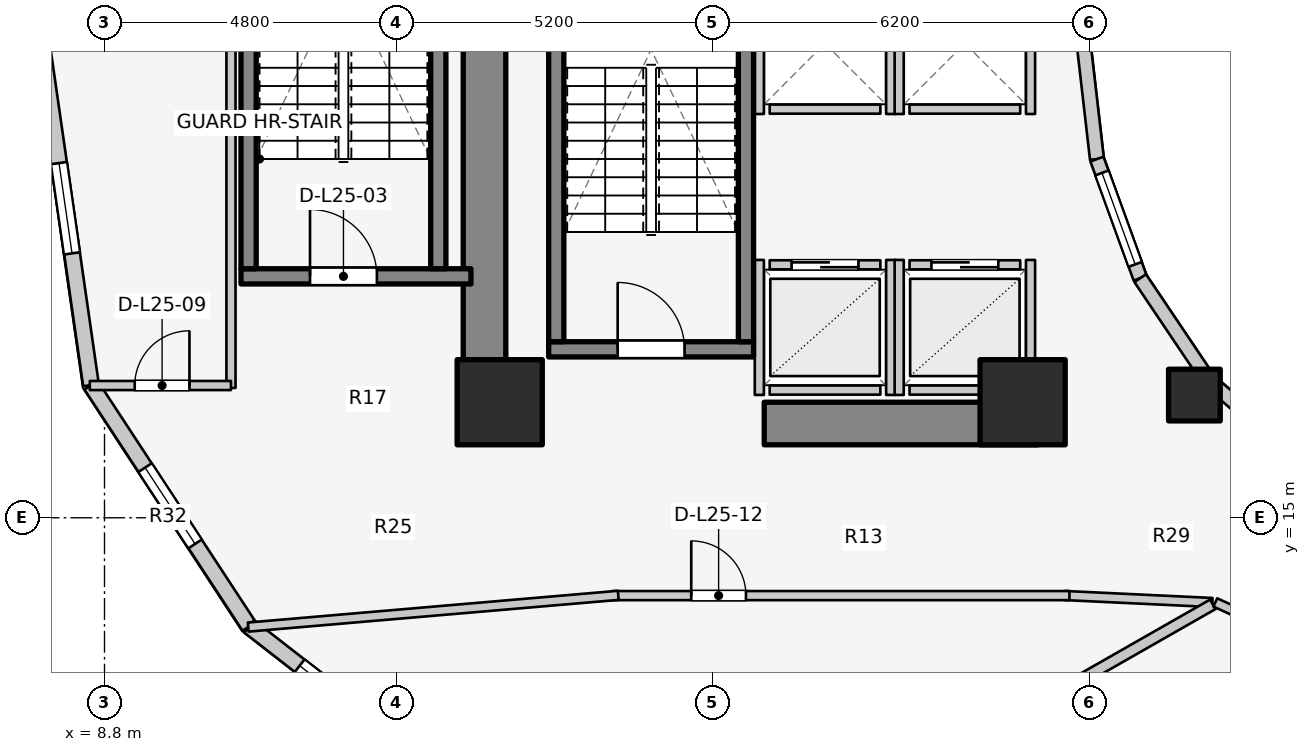
"""IFC4 building model, lengths in metres.
Left out: names, types, materials, properties, quantities, classifications, styles, units other than length and angle.
Written with IfcOpenShell. Run it as: python <this file> out.ifc"""

import sys

from ifc_helpers import new_model, si_unit, direction, frame, frame_2d, origin, origin_2d, place, context, subcontext, project, spatial, rectangle, extrude, element, fill, save


model = new_model("IFC4")
c1 = context("Model", 3, precision=1e-05, world=origin(), true_north=direction((0.0, 1.0)))
c2 = subcontext(c1, "Body", "Model", "MODEL_VIEW")
j1 = project(units=[si_unit("LENGTHUNIT", "METRE"), si_unit("PLANEANGLEUNIT", "RADIAN")], contexts=[c1])
p1 = place(None, origin())
s1 = spatial("IfcSite", under=j1, at=p1, CompositionType="ELEMENT")
p2 = place(p1, origin())
s2 = spatial("IfcBuilding", under=s1, at=p2, CompositionType="ELEMENT")
p3 = place(p2, frame((0.0, 0.0, 85.6)))
s3 = spatial("IfcBuildingStorey", under=s2, at=p3, CompositionType="ELEMENT", Elevation=85.6)
p4 = place(p3, frame((15.05, 17.05, 0.0), z_axis=(0.0, 0.0, 1.0), x_axis=(0.0, 1.0, 0.0)))
e1 = element("IfcWall", 1, at=p4, inside=s3, PredefinedType="SHEAR", context=c2, shape_type="SweptSolid", body=[
    extrude(rectangle(XDim=12.8, YDim=0.7, at=frame_2d((6.4, 0.0))), origin(), (0.0, 0.0, 1.0), 3.1),
])
p5 = place(p3, frame((19.65, 16.55, 0.0), z_axis=(0.0, 0.0, 1.0), x_axis=(1.0, 0.0, 0.0)))
e2 = element("IfcWall", 2, at=p5, inside=s3, PredefinedType="SHEAR", context=c2, shape_type="SweptSolid", body=[
    extrude(rectangle(XDim=4.5, YDim=0.7, at=frame_2d((2.25, 0.0))), origin(), (0.0, 0.0, 1.0), 3.1),
])
p6 = place(p3, frame((16.105, 17.77, 0.0), z_axis=(0.0, 0.0, 1.0), x_axis=(1.0, 0.0, 0.0)))
e3 = element("IfcWall", 3, at=p6, inside=s3, PredefinedType="SOLIDWALL", context=c2, shape_type="SweptSolid", body=[
    extrude(rectangle(XDim=3.37, YDim=0.25, at=frame_2d((1.685, 0.0))), origin(), (0.0, 0.0, 1.0), 3.1),
])
p7 = place(p6, frame((1.135, 0.0, 0.0)))
e4 = element("IfcOpeningElement", 4, at=p7, cuts=e3, PredefinedType="OPENING", context=c2, shape_type="SweptSolid", body=[
    extrude(rectangle(XDim=1.1, YDim=2.1, at=frame_2d((0.55, 1.05))), frame((0.0, 0.135, 0.0), z_axis=(0.0, -1.0, 0.0), x_axis=(1.0, 0.0, 0.0)), (0.0, 0.0, 1.0), 0.27),
])
for number, where, z_axis, x_axis in (
    (5, (16.23, 17.895, 0.0), (0.0, 0.0, 1.0), (0.0, 1.0, 0.0)),
    (6, (19.35, 17.895, 0.0), (0.0, 0.0, 1.0), (0.0, 1.0, 0.0)),
):
    element("IfcWall", number, at=place(p3, frame(where, z_axis=z_axis, x_axis=x_axis)), inside=s3, PredefinedType="SOLIDWALL", context=c2, shape_type="SweptSolid", body=[
        extrude(rectangle(XDim=7.81, YDim=0.25, at=frame_2d((3.905, 0.0))), origin(), (0.0, 0.0, 1.0), 3.1),
    ])
p8 = place(p3, frame((11.045, 18.97, 0.0), z_axis=(0.0, 0.0, 1.0), x_axis=(1.0, 0.0, 0.0)))
e7 = element("IfcWall", 7, at=p8, inside=s3, PredefinedType="SOLIDWALL", context=c2, shape_type="SweptSolid", body=[
    extrude(rectangle(XDim=3.782, YDim=0.25, at=frame_2d((1.891, 0.0))), origin(), (0.0, 0.0, 1.0), 3.1),
])
p9 = place(p8, frame((1.135, 0.0, 0.0)))
e8 = element("IfcOpeningElement", 8, at=p9, cuts=e7, PredefinedType="OPENING", context=c2, shape_type="SweptSolid", body=[
    extrude(rectangle(XDim=1.1, YDim=2.1, at=frame_2d((0.55, 1.05))), frame((0.0, 0.135, 0.0), z_axis=(0.0, -1.0, 0.0), x_axis=(1.0, 0.0, 0.0)), (0.0, 0.0, 1.0), 0.27),
])
for number, where, z_axis, x_axis in (
    (9, (11.17, 19.095, 0.0), (0.0, 0.0, 1.0), (0.0, 1.0, 0.0)),
    (10, (14.29, 19.095, 0.0), (0.0, 0.0, 1.0), (0.0, 1.0, 0.0)),
):
    element("IfcWall", number, at=place(p3, frame(where, z_axis=z_axis, x_axis=x_axis)), inside=s3, PredefinedType="SOLIDWALL", context=c2, shape_type="SweptSolid", body=[
        extrude(rectangle(XDim=7.81, YDim=0.25, at=frame_2d((3.905, 0.0))), origin(), (0.0, 0.0, 1.0), 3.1),
    ])
for number, where, z_axis, x_axis in (
    (11, (15.3, 16.9, 0.0), (0.0, 0.0, 1.0), (1.0, 0.0, 0.0)),
    (12, (23.9, 16.9, 0.0), (0.0, 0.0, 1.0), (1.0, 0.0, 0.0)),
):
    element("IfcColumn", number, at=place(p3, frame(where, z_axis=z_axis, x_axis=x_axis)), inside=s3, PredefinedType="COLUMN", context=c2, shape_type="SweptSolid", body=[
        extrude(rectangle(XDim=1.4, YDim=1.4, at=origin_2d()), origin(), (0.0, 0.0, 1.0), 3.1),
    ])
p10 = place(p3, frame((26.725, 17.018, 0.0), z_axis=(0.0, 0.0, 1.0), x_axis=(1.0, 0.0, 0.0)))
e13 = element("IfcColumn", 13, at=p10, inside=s3, PredefinedType="COLUMN", context=c2, shape_type="SweptSolid", body=[
    extrude(rectangle(XDim=0.85, YDim=0.85, at=origin_2d()), origin(), (0.0, 0.0, 1.0), 3.1),
])
p11 = place(p3, frame((24.88, 23.0, 0.0), z_axis=(0.0, 0.0, 1.0), x_axis=(0.114711713601, -0.993398823617, 0.0)))
e14 = element("IfcWall", 14, at=p11, inside=s3, PredefinedType="STANDARD", context=c2, shape_type="SweptSolid", body=[
    extrude(rectangle(XDim=2.115, YDim=0.23, at=frame_2d((1.058, 0.0))), origin(), (0.0, 0.0, 1.0), 2.84),
])
p12 = place(p3, frame((25.123, 20.898, 0.0), z_axis=(0.0, 0.0, 1.0), x_axis=(0.341423187295, -0.93990968033, 0.0)))
e15 = element("IfcWall", 15, at=p12, inside=s3, PredefinedType="STANDARD", context=c2, shape_type="SweptSolid", body=[
    extrude(rectangle(XDim=2.084, YDim=0.23, at=frame_2d((1.042, 0.0))), origin(), (0.0, 0.0, 1.0), 2.84),
])
p13 = place(p12, frame((0.242, 0.0, 0.85)))
e16 = element("IfcOpeningElement", 16, at=p13, cuts=e15, PredefinedType="OPENING", context=c2, shape_type="SweptSolid", body=[
    extrude(rectangle(XDim=1.6, YDim=1.65, at=frame_2d((0.8, 0.825))), frame((0.0, 0.125, 0.0), z_axis=(0.0, -1.0, 0.0), x_axis=(1.0, 0.0, 0.0)), (0.0, 0.0, 1.0), 0.25),
])
p14 = place(p3, frame((25.834, 18.94, 0.0), z_axis=(0.0, 0.0, 1.0), x_axis=(0.558197800898, -0.829707909492, 0.0)))
e17 = element("IfcWall", 17, at=p14, inside=s3, PredefinedType="STANDARD", context=c2, shape_type="SweptSolid", body=[
    extrude(rectangle(XDim=2.027, YDim=0.23, at=frame_2d((1.013, 0.0))), origin(), (0.0, 0.0, 1.0), 2.16),
])
p15 = place(p3, frame((26.965, 17.258, 0.0), z_axis=(0.0, 0.0, 1.0), x_axis=(0.752576694707, -0.658504607869, 0.0)))
e18 = element("IfcWall", 18, at=p15, inside=s3, PredefinedType="STANDARD", context=c2, shape_type="SweptSolid", body=[
    extrude(rectangle(XDim=1.959, YDim=0.23, at=frame_2d((0.98, 0.0))), origin(), (0.0, 0.0, 1.0), 2.16),
])
p16 = place(p3, frame((7.74, 23.0, 0.0), z_axis=(0.0, 0.0, 1.0), x_axis=(0.142572472068, -0.98978436551, 0.0)))
e19 = element("IfcWall", 19, at=p16, inside=s3, PredefinedType="STANDARD", context=c2, shape_type="SweptSolid", body=[
    extrude(rectangle(XDim=5.879, YDim=0.26, at=frame_2d((2.939, 0.0))), origin(), (0.0, 0.0, 1.0), 2.85),
])
p17 = place(p16, frame((2.189, 0.0, 0.75)))
e20 = element("IfcOpeningElement", 20, at=p17, cuts=e19, PredefinedType="OPENING", context=c2, shape_type="SweptSolid", body=[
    extrude(rectangle(XDim=1.5, YDim=1.6, at=frame_2d((0.75, 0.8))), frame((0.0, 0.14, 0.0), z_axis=(0.0, -1.0, 0.0), x_axis=(1.0, 0.0, 0.0)), (0.0, 0.0, 1.0), 0.28),
])
p18 = place(p3, frame((8.578, 17.181, 0.0), z_axis=(0.0, 0.0, 1.0), x_axis=(0.548283220945, -0.836292717672, 0.0)))
e21 = element("IfcWall", 21, at=p18, inside=s3, PredefinedType="STANDARD", context=c2, shape_type="SweptSolid", body=[
    extrude(rectangle(XDim=4.744, YDim=0.26, at=frame_2d((2.372, 0.0))), origin(), (0.0, 0.0, 1.0), 2.85),
])
p19 = place(p18, frame((1.622, 0.0, 0.75)))
e22 = element("IfcOpeningElement", 22, at=p19, cuts=e21, PredefinedType="OPENING", context=c2, shape_type="SweptSolid", body=[
    extrude(rectangle(XDim=1.5, YDim=1.6, at=frame_2d((0.75, 0.8))), frame((0.0, 0.14, 0.0), z_axis=(0.0, -1.0, 0.0), x_axis=(1.0, 0.0, 0.0)), (0.0, 0.0, 1.0), 0.28),
])
p20 = place(p3, frame((11.179, 13.214, 0.0), z_axis=(0.0, 0.0, 1.0), x_axis=(0.789127449954, -0.614229491094, 0.0)))
e23 = element("IfcWall", 23, at=p20, inside=s3, PredefinedType="STANDARD", context=c2, shape_type="SweptSolid", body=[
    extrude(rectangle(XDim=4.505, YDim=0.26, at=frame_2d((2.252, 0.0))), origin(), (0.0, 0.0, 1.0), 2.85),
])
p21 = place(p20, frame((1.052, 0.0, 0.75)))
e24 = element("IfcOpeningElement", 24, at=p21, cuts=e23, PredefinedType="OPENING", context=c2, shape_type="SweptSolid", body=[
    extrude(rectangle(XDim=2.4, YDim=1.7, at=frame_2d((1.2, 0.85))), frame((0.0, 0.14, 0.0), z_axis=(0.0, -1.0, 0.0), x_axis=(1.0, 0.0, 0.0)), (0.0, 0.0, 1.0), 0.28),
])
p22 = place(p3, frame((19.74, 19.16, 0.0), z_axis=(0.0, 0.0, 1.0), x_axis=(1.0, 0.0, 0.0)))
e25 = element("IfcWall", 25, at=p22, inside=s3, PredefinedType="SOLIDWALL", context=c2, shape_type="SweptSolid", body=[
    extrude(rectangle(XDim=1.82, YDim=0.15, at=frame_2d((0.91, 0.0))), origin(), (0.0, 0.0, 1.0), 2.855),
])
p23 = place(p22, frame((0.36, 0.0, 0.0)))
e26 = element("IfcOpeningElement", 26, at=p23, cuts=e25, PredefinedType="OPENING", context=c2, shape_type="SweptSolid", body=[
    extrude(rectangle(XDim=1.1, YDim=2.1, at=frame_2d((0.55, 1.05))), frame((0.0, 0.085, 0.0), z_axis=(0.0, -1.0, 0.0), x_axis=(1.0, 0.0, 0.0)), (0.0, 0.0, 1.0), 0.17),
])
p24 = place(p3, frame((19.74, 17.1, 0.0), z_axis=(0.0, 0.0, 1.0), x_axis=(1.0, 0.0, 0.0)))
e27 = element("IfcWall", 27, at=p24, inside=s3, PredefinedType="SOLIDWALL", context=c2, shape_type="SweptSolid", body=[
    extrude(rectangle(XDim=1.82, YDim=0.15, at=frame_2d((0.91, 0.0))), origin(), (0.0, 0.0, 1.0), 2.855),
])
p25 = place(p3, frame((19.57, 17.02, 0.0), z_axis=(0.0, 0.0, 1.0), x_axis=(0.0, 1.0, 0.0)))
e28 = element("IfcWall", 28, at=p25, inside=s3, PredefinedType="SOLIDWALL", context=c2, shape_type="SweptSolid", body=[
    extrude(rectangle(XDim=2.22, YDim=0.15, at=frame_2d((1.11, 0.0))), origin(), (0.0, 0.0, 1.0), 2.12),
])
p26 = place(p3, frame((21.73, 17.02, 0.0), z_axis=(0.0, 0.0, 1.0), x_axis=(0.0, 1.0, 0.0)))
e29 = element("IfcWall", 29, at=p26, inside=s3, PredefinedType="SOLIDWALL", context=c2, shape_type="SweptSolid", body=[
    extrude(rectangle(XDim=2.22, YDim=0.15, at=frame_2d((1.11, 0.0))), origin(), (0.0, 0.0, 1.0), 2.855),
])
p27 = place(p3, frame((22.04, 19.16, 0.0), z_axis=(0.0, 0.0, 1.0), x_axis=(1.0, 0.0, 0.0)))
e30 = element("IfcWall", 30, at=p27, inside=s3, PredefinedType="SOLIDWALL", context=c2, shape_type="SweptSolid", body=[
    extrude(rectangle(XDim=1.82, YDim=0.15, at=frame_2d((0.91, 0.0))), origin(), (0.0, 0.0, 1.0), 2.12),
])
p28 = place(p27, frame((0.36, 0.0, 0.0)))
e31 = element("IfcOpeningElement", 31, at=p28, cuts=e30, PredefinedType="OPENING", context=c2, shape_type="SweptSolid", body=[
    extrude(rectangle(XDim=1.1, YDim=2.1, at=frame_2d((0.55, 1.05))), frame((0.0, 0.085, 0.0), z_axis=(0.0, -1.0, 0.0), x_axis=(1.0, 0.0, 0.0)), (0.0, 0.0, 1.0), 0.17),
])
p29 = place(p3, frame((22.04, 17.1, 0.0), z_axis=(0.0, 0.0, 1.0), x_axis=(1.0, 0.0, 0.0)))
e32 = element("IfcWall", 32, at=p29, inside=s3, PredefinedType="SOLIDWALL", context=c2, shape_type="SweptSolid", body=[
    extrude(rectangle(XDim=1.82, YDim=0.15, at=frame_2d((0.91, 0.0))), origin(), (0.0, 0.0, 1.0), 2.12),
])
p30 = place(p3, frame((21.87, 17.02, 0.0), z_axis=(0.0, 0.0, 1.0), x_axis=(0.0, 1.0, 0.0)))
e33 = element("IfcWall", 33, at=p30, inside=s3, PredefinedType="SOLIDWALL", context=c2, shape_type="SweptSolid", body=[
    extrude(rectangle(XDim=2.22, YDim=0.15, at=frame_2d((1.11, 0.0))), origin(), (0.0, 0.0, 1.0), 2.855),
])
p31 = place(p3, frame((24.03, 17.02, 0.0), z_axis=(0.0, 0.0, 1.0), x_axis=(0.0, 1.0, 0.0)))
e34 = element("IfcWall", 34, at=p31, inside=s3, PredefinedType="SOLIDWALL", context=c2, shape_type="SweptSolid", body=[
    extrude(rectangle(XDim=2.22, YDim=0.15, at=frame_2d((1.11, 0.0))), origin(), (0.0, 0.0, 1.0), 2.12),
])
p32 = place(p3, frame((19.74, 21.72, 0.0), z_axis=(0.0, 0.0, 1.0), x_axis=(1.0, 0.0, 0.0)))
e35 = element("IfcWall", 35, at=p32, inside=s3, PredefinedType="SOLIDWALL", context=c2, shape_type="SweptSolid", body=[
    extrude(rectangle(XDim=1.82, YDim=0.15, at=frame_2d((0.91, 0.0))), origin(), (0.0, 0.0, 1.0), 2.855),
])
for number, where, z_axis, x_axis in (
    (36, (19.57, 21.64, 0.0), (0.0, 0.0, 1.0), (0.0, 1.0, 0.0)),
    (37, (21.73, 21.64, 0.0), (0.0, 0.0, 1.0), (0.0, 1.0, 0.0)),
):
    element("IfcWall", number, at=place(p3, frame(where, z_axis=z_axis, x_axis=x_axis)), inside=s3, PredefinedType="SOLIDWALL", context=c2, shape_type="SweptSolid", body=[
        extrude(rectangle(XDim=2.32, YDim=0.15, at=frame_2d((1.16, 0.0))), origin(), (0.0, 0.0, 1.0), 2.855),
    ])
p33 = place(p3, frame((22.04, 21.72, 0.0), z_axis=(0.0, 0.0, 1.0), x_axis=(1.0, 0.0, 0.0)))
e38 = element("IfcWall", 38, at=p33, inside=s3, PredefinedType="SOLIDWALL", context=c2, shape_type="SweptSolid", body=[
    extrude(rectangle(XDim=1.82, YDim=0.15, at=frame_2d((0.91, 0.0))), origin(), (0.0, 0.0, 1.0), 2.12),
])
p34 = place(p3, frame((21.87, 21.64, 0.0), z_axis=(0.0, 0.0, 1.0), x_axis=(0.0, 1.0, 0.0)))
e39 = element("IfcWall", 39, at=p34, inside=s3, PredefinedType="SOLIDWALL", context=c2, shape_type="SweptSolid", body=[
    extrude(rectangle(XDim=2.32, YDim=0.15, at=frame_2d((1.16, 0.0))), origin(), (0.0, 0.0, 1.0), 2.855),
])
p35 = place(p3, frame((24.03, 21.64, 0.0), z_axis=(0.0, 0.0, 1.0), x_axis=(0.0, 1.0, 0.0)))
e40 = element("IfcWall", 40, at=p35, inside=s3, PredefinedType="SOLIDWALL", context=c2, shape_type="SweptSolid", body=[
    extrude(rectangle(XDim=2.32, YDim=0.15, at=frame_2d((1.16, 0.0))), origin(), (0.0, 0.0, 1.0), 2.12),
])
p36 = place(p3, frame((10.88, 17.135, 0.0), z_axis=(0.0, 0.0, 1.0), x_axis=(0.0, 1.0, 0.0)))
e41 = element("IfcWall", 41, at=p36, inside=s3, PredefinedType="PARTITIONING", context=c2, shape_type="SweptSolid", body=[
    extrude(rectangle(XDim=11.73, YDim=0.15, at=frame_2d((5.865, 0.0))), origin(), (0.0, 0.0, 1.0), 2.12),
])
p37 = place(p3, frame((8.558, 17.175, 0.0), z_axis=(0.0, 0.0, 1.0), x_axis=(1.0, 0.0, 0.0)))
e42 = element("IfcWall", 42, at=p37, inside=s3, PredefinedType="PARTITIONING", context=c2, shape_type="SweptSolid", body=[
    extrude(rectangle(XDim=2.322, YDim=0.15, at=frame_2d((1.161, 0.0))), origin(), (0.0, 0.0, 1.0), 2.855),
])
p38 = place(p37, frame((0.739, 0.0, 0.0)))
e43 = element("IfcOpeningElement", 43, at=p38, cuts=e42, PredefinedType="OPENING", context=c2, shape_type="SweptSolid", body=[
    extrude(rectangle(XDim=0.9, YDim=2.1, at=frame_2d((0.45, 1.05))), frame((0.0, 0.085, 0.0), z_axis=(0.0, -1.0, 0.0), x_axis=(1.0, 0.0, 0.0)), (0.0, 0.0, 1.0), 0.17),
])
p39 = place(p3, frame((27.02, 13.606, 0.0), z_axis=(0.0, 0.0, 1.0), x_axis=(-0.998877427952, 0.047369651964, 0.0)))
e44 = element("IfcWall", 44, at=p39, inside=s3, PredefinedType="PARTITIONING", context=c2, shape_type="SweptSolid", body=[
    extrude(rectangle(XDim=2.433, YDim=0.15, at=frame_2d((1.216, 0.0))), origin(), (0.0, 0.0, 1.0), 2.272),
])
p40 = place(p3, frame((17.15, 13.72, 0.0), z_axis=(0.0, 0.0, 1.0), x_axis=(1.0, 0.0, 0.0)))
e45 = element("IfcWall", 45, at=p40, inside=s3, PredefinedType="PARTITIONING", context=c2, shape_type="SweptSolid", body=[
    extrude(rectangle(XDim=7.52, YDim=0.15, at=frame_2d((3.76, 0.0))), origin(), (0.0, 0.0, 1.0), 2.272),
])
p41 = place(p40, frame((1.3, 0.0, 0.0)))
e46 = element("IfcOpeningElement", 46, at=p41, cuts=e45, PredefinedType="OPENING", context=c2, shape_type="SweptSolid", body=[
    extrude(rectangle(XDim=0.9, YDim=2.1, at=frame_2d((0.45, 1.05))), frame((0.0, 0.085, 0.0), z_axis=(0.0, -1.0, 0.0), x_axis=(1.0, 0.0, 0.0)), (0.0, 0.0, 1.0), 0.17),
])
p42 = place(p3, frame((17.25, 13.724, 0.0), z_axis=(0.0, 0.0, 1.0), x_axis=(-0.996341886029, -0.085456691633, 0.0)))
e47 = element("IfcWall", 47, at=p42, inside=s3, PredefinedType="PARTITIONING", context=c2, shape_type="SweptSolid", body=[
    extrude(rectangle(XDim=6.108, YDim=0.15, at=frame_2d((3.054, 0.0))), origin(), (0.0, 0.0, 1.0), 2.142),
])
p43 = place(p3, frame((27.027, 13.576, 0.0), z_axis=(0.0, 0.0, 1.0), x_axis=(-0.868484076301, -0.495717065685, 0.0)))
e48 = element("IfcWall", 48, at=p43, inside=s3, PredefinedType="PARTITIONING", context=c2, shape_type="SweptSolid", body=[
    extrude(rectangle(XDim=8.789, YDim=0.18, at=frame_2d((4.394, 0.0))), origin(), (0.0, 0.0, 1.0), 2.272),
])
p44 = place(p3, frame((27.069, 13.607, 0.0), z_axis=(0.0, 0.0, 1.0), x_axis=(0.909747571199, -0.415161843982, 0.0)))
e49 = element("IfcWall", 49, at=p44, inside=s3, PredefinedType="PARTITIONING", context=c2, shape_type="SweptSolid", body=[
    extrude(rectangle(XDim=2.625, YDim=0.15, at=frame_2d((1.312, 0.0))), origin(), (0.0, 0.0, 1.0), 2.272),
])
p45 = place(p13, origin())
e50 = element("IfcWindow", 50, at=p45, inside=s3, PartitioningType="SINGLE_PANEL", PredefinedType="WINDOW", context=c2, shape_type="SweptSolid", body=[
    extrude(rectangle(XDim=1.6, YDim=1.65, at=frame_2d((0.8, 0.825))), frame((0.0, 0.03, 0.0), z_axis=(0.0, -1.0, 0.0), x_axis=(1.0, 0.0, 0.0)), (0.0, 0.0, 1.0), 0.06),
])
fill(e16, e50)
p46 = place(p17, origin())
e51 = element("IfcWindow", 51, at=p46, inside=s3, PartitioningType="SINGLE_PANEL", PredefinedType="WINDOW", context=c2, shape_type="SweptSolid", body=[
    extrude(rectangle(XDim=1.5, YDim=1.6, at=frame_2d((0.75, 0.8))), frame((0.0, 0.03, 0.0), z_axis=(0.0, -1.0, 0.0), x_axis=(1.0, 0.0, 0.0)), (0.0, 0.0, 1.0), 0.06),
])
fill(e20, e51)
p47 = place(p19, origin())
e52 = element("IfcWindow", 52, at=p47, inside=s3, PartitioningType="SINGLE_PANEL", PredefinedType="WINDOW", context=c2, shape_type="SweptSolid", body=[
    extrude(rectangle(XDim=1.5, YDim=1.6, at=frame_2d((0.75, 0.8))), frame((0.0, 0.03, 0.0), z_axis=(0.0, -1.0, 0.0), x_axis=(1.0, 0.0, 0.0)), (0.0, 0.0, 1.0), 0.06),
])
fill(e22, e52)
p48 = place(p21, origin())
e53 = element("IfcWindow", 53, at=p48, inside=s3, PartitioningType="SINGLE_PANEL", PredefinedType="WINDOW", context=c2, shape_type="SweptSolid", body=[
    extrude(rectangle(XDim=2.4, YDim=1.7, at=frame_2d((1.2, 0.85))), frame((0.0, 0.03, 0.0), z_axis=(0.0, -1.0, 0.0), x_axis=(1.0, 0.0, 0.0)), (0.0, 0.0, 1.0), 0.06),
])
fill(e24, e53)
p49 = place(p7, origin())
e54 = element("IfcDoor", 54, at=p49, inside=s3, OperationType="SINGLE_SWING_LEFT", PredefinedType="DOOR", context=c2, shape_type="SweptSolid", body=[
    extrude(rectangle(XDim=1.1, YDim=2.1, at=frame_2d((0.55, 1.05))), frame((0.0, 0.025, 0.0), z_axis=(0.0, -1.0, 0.0), x_axis=(1.0, 0.0, 0.0)), (0.0, 0.0, 1.0), 0.05),
])
fill(e4, e54)
p50 = place(p9, origin())
e55 = element("IfcDoor", 55, at=p50, inside=s3, OperationType="SINGLE_SWING_LEFT", PredefinedType="DOOR", context=c2, shape_type="SweptSolid", body=[
    extrude(rectangle(XDim=1.1, YDim=2.1, at=frame_2d((0.55, 1.05))), frame((0.0, 0.025, 0.0), z_axis=(0.0, -1.0, 0.0), x_axis=(1.0, 0.0, 0.0)), (0.0, 0.0, 1.0), 0.05),
])
fill(e8, e55)
p51 = place(p23, origin())
e56 = element("IfcDoor", 56, at=p51, inside=s3, OperationType="DOUBLE_DOOR_SLIDING", PredefinedType="DOOR", context=c2, shape_type="SweptSolid", body=[
    extrude(rectangle(XDim=1.1, YDim=2.1, at=frame_2d((0.55, 1.05))), frame((0.0, 0.025, 0.0), z_axis=(0.0, -1.0, 0.0), x_axis=(1.0, 0.0, 0.0)), (0.0, 0.0, 1.0), 0.05),
])
fill(e26, e56)
p52 = place(p28, origin())
e57 = element("IfcDoor", 57, at=p52, inside=s3, OperationType="DOUBLE_DOOR_SLIDING", PredefinedType="DOOR", context=c2, shape_type="SweptSolid", body=[
    extrude(rectangle(XDim=1.1, YDim=2.1, at=frame_2d((0.55, 1.05))), frame((0.0, 0.025, 0.0), z_axis=(0.0, -1.0, 0.0), x_axis=(1.0, 0.0, 0.0)), (0.0, 0.0, 1.0), 0.05),
])
fill(e31, e57)
p53 = place(p38, origin())
e58 = element("IfcDoor", 58, at=p53, inside=s3, OperationType="SINGLE_SWING_RIGHT", PredefinedType="DOOR", context=c2, shape_type="SweptSolid", body=[
    extrude(rectangle(XDim=0.9, YDim=2.1, at=frame_2d((0.45, 1.05))), frame((0.0, 0.025, 0.0), z_axis=(0.0, -1.0, 0.0), x_axis=(1.0, 0.0, 0.0)), (0.0, 0.0, 1.0), 0.05),
])
fill(e43, e58)
p54 = place(p41, origin())
e59 = element("IfcDoor", 59, at=p54, inside=s3, OperationType="SINGLE_SWING_LEFT", PredefinedType="DOOR", context=c2, shape_type="SweptSolid", body=[
    extrude(rectangle(XDim=0.9, YDim=2.1, at=frame_2d((0.45, 1.05))), frame((0.0, 0.025, 0.0), z_axis=(0.0, -1.0, 0.0), x_axis=(1.0, 0.0, 0.0)), (0.0, 0.0, 1.0), 0.05),
])
fill(e46, e59)
save(model, sys.argv[1])
